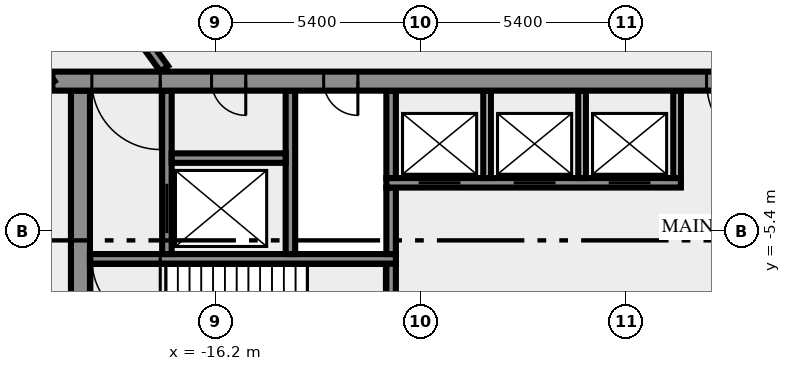
"""IFC4 building model, lengths in metres.
Left out: names, types, materials, properties, quantities, classifications, styles, units other than length and angle.
Written with IfcOpenShell. Run it as: python <this file> out.ifc"""

import sys

from ifc_helpers import new_model, si_unit, direction, frame, frame_2d, origin, place, context, subcontext, project, spatial, rectangle, extrude, element, fill, save


model = new_model("IFC4")
c1 = context("Model", 3, precision=1e-05, world=origin(), true_north=direction((0.0, 1.0)))
c2 = subcontext(c1, "Body", "Model", "MODEL_VIEW")
j1 = project(units=[si_unit("LENGTHUNIT", "METRE"), si_unit("PLANEANGLEUNIT", "RADIAN")], contexts=[c1])
p1 = place(None, origin())
s1 = spatial("IfcSite", under=j1, at=p1, CompositionType="ELEMENT")
p2 = place(p1, origin())
s2 = spatial("IfcBuilding", under=s1, at=p2, CompositionType="ELEMENT")
p3 = place(p2, origin())
s3 = spatial("IfcBuildingStorey", under=s2, at=p3, CompositionType="ELEMENT", Elevation=0.0)
p4 = place(p3, frame((-19.75, -11.0, 0.0), z_axis=(0.0, 0.0, 1.0), x_axis=(0.0, 1.0, 0.0)))
e1 = element("IfcWall", 1, at=p4, inside=s3, PredefinedType="SHEAR", context=c2, shape_type="SweptSolid", body=[
    extrude(rectangle(XDim=9.3, YDim=0.5, at=frame_2d((4.65, 0.0))), origin(), (0.0, 0.0, 1.0), 5.6),
])
p5 = place(p3, frame((-11.575, -7.25, 0.0), z_axis=(0.0, 0.0, 1.0), x_axis=(0.0, 1.0, 0.0)))
e2 = element("IfcWall", 2, at=p5, inside=s3, PredefinedType="SHEAR", context=c2, shape_type="SweptSolid", body=[
    extrude(rectangle(XDim=1.0, YDim=0.25, at=frame_2d((0.5, 0.0))), origin(), (0.0, 0.0, 1.0), 5.6),
])
p6 = place(p3, frame((-11.45, -6.125, 0.0), z_axis=(0.0, 0.0, 1.0), x_axis=(-1.0, 0.0, 0.0)))
e3 = element("IfcWall", 3, at=p6, inside=s3, PredefinedType="SHEAR", context=c2, shape_type="SweptSolid", body=[
    extrude(rectangle(XDim=8.05, YDim=0.25, at=frame_2d((4.025, 0.0))), origin(), (0.0, 0.0, 1.0), 5.6),
])
p7 = place(p6, frame((6.2, 0.0, 0.0)))
e4 = element("IfcOpeningElement", 4, at=p7, cuts=e3, PredefinedType="OPENING", context=c2, shape_type="SweptSolid", body=[
    extrude(rectangle(XDim=1.8, YDim=2.1, at=frame_2d((0.9, 1.05))), frame((0.0, 0.135, 0.0), z_axis=(0.0, -1.0, 0.0), x_axis=(1.0, 0.0, 0.0)), (0.0, 0.0, 1.0), 0.27),
])
p8 = place(p3, frame((-17.475, -6.0, 0.0), z_axis=(0.0, 0.0, 1.0), x_axis=(0.0, 1.0, 0.0)))
e5 = element("IfcWall", 5, at=p8, inside=s3, PredefinedType="SHEAR", context=c2, shape_type="SweptSolid", body=[
    extrude(rectangle(XDim=4.3, YDim=0.25, at=frame_2d((2.15, 0.0))), origin(), (0.0, 0.0, 1.0), 5.6),
])
p9 = place(p8, frame((0.55, 0.0, 0.0)))
e6 = element("IfcOpeningElement", 6, at=p9, cuts=e5, PredefinedType="OPENING", context=c2, shape_type="SweptSolid", body=[
    extrude(rectangle(XDim=1.3, YDim=2.1, at=frame_2d((0.65, 1.05))), frame((0.0, 0.135, 0.0), z_axis=(0.0, -1.0, 0.0), x_axis=(1.0, 0.0, 0.0)), (0.0, 0.0, 1.0), 0.27),
])
p10 = place(p3, frame((-14.225, -6.0, 0.0), z_axis=(0.0, 0.0, 1.0), x_axis=(0.0, 1.0, 0.0)))
e7 = element("IfcWall", 7, at=p10, inside=s3, PredefinedType="SHEAR", context=c2, shape_type="SweptSolid", body=[
    extrude(rectangle(XDim=4.3, YDim=0.25, at=frame_2d((2.15, 0.0))), origin(), (0.0, 0.0, 1.0), 5.6),
])
p11 = place(p3, frame((-11.575, -6.0, 0.0), z_axis=(0.0, 0.0, 1.0), x_axis=(0.0, 1.0, 0.0)))
e8 = element("IfcWall", 8, at=p11, inside=s3, PredefinedType="SHEAR", context=c2, shape_type="SweptSolid", body=[
    extrude(rectangle(XDim=1.75, YDim=0.25, at=frame_2d((0.875, 0.0))), origin(), (0.0, 0.0, 1.0), 5.6),
])
p12 = place(p3, frame((-11.7, -4.125, 0.0), z_axis=(0.0, 0.0, 1.0), x_axis=(1.0, 0.0, 0.0)))
e9 = element("IfcWall", 9, at=p12, inside=s3, PredefinedType="SHEAR", context=c2, shape_type="SweptSolid", body=[
    extrude(rectangle(XDim=7.75, YDim=0.25, at=frame_2d((3.875, 0.0))), origin(), (0.0, 0.0, 1.0), 5.6),
])
p13 = place(p12, frame((0.85, 0.0, 0.0)))
e10 = element("IfcOpeningElement", 10, at=p13, cuts=e9, PredefinedType="OPENING", context=c2, shape_type="SweptSolid", body=[
    extrude(rectangle(XDim=1.1, YDim=2.1, at=frame_2d((0.55, 1.05))), frame((0.0, 0.135, 0.0), z_axis=(0.0, -1.0, 0.0), x_axis=(1.0, 0.0, 0.0)), (0.0, 0.0, 1.0), 0.27),
])
p14 = place(p12, frame((3.35, 0.0, 0.0)))
e11 = element("IfcOpeningElement", 11, at=p14, cuts=e9, PredefinedType="OPENING", context=c2, shape_type="SweptSolid", body=[
    extrude(rectangle(XDim=1.1, YDim=2.1, at=frame_2d((0.55, 1.05))), frame((0.0, 0.135, 0.0), z_axis=(0.0, -1.0, 0.0), x_axis=(1.0, 0.0, 0.0)), (0.0, 0.0, 1.0), 0.27),
])
p15 = place(p12, frame((5.85, 0.0, 0.0)))
e12 = element("IfcOpeningElement", 12, at=p15, cuts=e9, PredefinedType="OPENING", context=c2, shape_type="SweptSolid", body=[
    extrude(rectangle(XDim=1.1, YDim=2.1, at=frame_2d((0.55, 1.05))), frame((0.0, 0.135, 0.0), z_axis=(0.0, -1.0, 0.0), x_axis=(1.0, 0.0, 0.0)), (0.0, 0.0, 1.0), 0.27),
])
p16 = place(p3, frame((-11.575, -4.0, 0.0), z_axis=(0.0, 0.0, 1.0), x_axis=(0.0, 1.0, 0.0)))
e13 = element("IfcWall", 13, at=p16, inside=s3, PredefinedType="SHEAR", context=c2, shape_type="SweptSolid", body=[
    extrude(rectangle(XDim=2.3, YDim=0.25, at=frame_2d((1.15, 0.0))), origin(), (0.0, 0.0, 1.0), 5.6),
])
for number, where, z_axis, x_axis in (
    (14, (-9.05, -4.0, 0.0), (0.0, 0.0, 1.0), (0.0, 1.0, 0.0)),
    (15, (-6.55, -4.0, 0.0), (0.0, 0.0, 1.0), (0.0, 1.0, 0.0)),
    (16, (-4.05, -4.0, 0.0), (0.0, 0.0, 1.0), (0.0, 1.0, 0.0)),
):
    element("IfcWall", number, at=place(p3, frame(where, z_axis=z_axis, x_axis=x_axis)), inside=s3, PredefinedType="SOLIDWALL", context=c2, shape_type="SweptSolid", body=[
        extrude(rectangle(XDim=2.3, YDim=0.2, at=frame_2d((1.15, 0.0))), origin(), (0.0, 0.0, 1.0), 5.6),
    ])
p17 = place(p3, frame((-17.35, -3.475, 0.0), z_axis=(0.0, 0.0, 1.0), x_axis=(1.0, 0.0, 0.0)))
e17 = element("IfcWall", 17, at=p17, inside=s3, PredefinedType="SHEAR", context=c2, shape_type="SweptSolid", body=[
    extrude(rectangle(XDim=3.0, YDim=0.25, at=frame_2d((1.5, 0.0))), origin(), (0.0, 0.0, 1.0), 5.6),
])
p18 = place(p3, frame((20.49, -1.45, 0.0), z_axis=(0.0, 0.0, 1.0), x_axis=(-1.0, 0.0, 0.0)))
e18 = element("IfcWall", 18, at=p18, inside=s3, PredefinedType="SHEAR", context=c2, shape_type="SweptSolid", body=[
    extrude(rectangle(XDim=40.98, YDim=0.5, at=frame_2d((20.49, 0.0))), origin(), (0.0, 0.0, 1.0), 5.6),
])
p19 = place(p18, frame((38.14, 0.0, 0.0)))
e19 = element("IfcOpeningElement", 19, at=p19, cuts=e18, PredefinedType="OPENING", context=c2, shape_type="SweptSolid", body=[
    extrude(rectangle(XDim=1.8, YDim=2.1, at=frame_2d((0.9, 1.05))), frame((0.0, 0.26, 0.0), z_axis=(0.0, -1.0, 0.0), x_axis=(1.0, 0.0, 0.0)), (0.0, 0.0, 1.0), 0.52),
])
p20 = place(p18, frame((35.89, 0.0, 0.0)))
e20 = element("IfcOpeningElement", 20, at=p20, cuts=e18, PredefinedType="OPENING", context=c2, shape_type="SweptSolid", body=[
    extrude(rectangle(XDim=0.9, YDim=2.1, at=frame_2d((0.45, 1.05))), frame((0.0, 0.26, 0.0), z_axis=(0.0, -1.0, 0.0), x_axis=(1.0, 0.0, 0.0)), (0.0, 0.0, 1.0), 0.52),
])
p21 = place(p18, frame((32.94, 0.0, 0.0)))
e21 = element("IfcOpeningElement", 21, at=p21, cuts=e18, PredefinedType="OPENING", context=c2, shape_type="SweptSolid", body=[
    extrude(rectangle(XDim=0.9, YDim=2.1, at=frame_2d((0.45, 1.05))), frame((0.0, 0.26, 0.0), z_axis=(0.0, -1.0, 0.0), x_axis=(1.0, 0.0, 0.0)), (0.0, 0.0, 1.0), 0.52),
])
p22 = place(p18, frame((21.765, 0.0, 0.0)))
e22 = element("IfcOpeningElement", 22, at=p22, cuts=e18, PredefinedType="OPENING", context=c2, shape_type="SweptSolid", body=[
    extrude(rectangle(XDim=2.0, YDim=2.1, at=frame_2d((1.0, 1.05))), frame((0.0, 0.26, 0.0), z_axis=(0.0, -1.0, 0.0), x_axis=(1.0, 0.0, 0.0)), (0.0, 0.0, 1.0), 0.52),
])
p23 = place(p18, frame((7.14, 0.0, 0.0)))
e23 = element("IfcOpeningElement", 23, at=p23, cuts=e18, PredefinedType="OPENING", context=c2, shape_type="SweptSolid", body=[
    extrude(rectangle(XDim=0.9, YDim=2.1, at=frame_2d((0.45, 1.05))), frame((0.0, 0.26, 0.0), z_axis=(0.0, -1.0, 0.0), x_axis=(1.0, 0.0, 0.0)), (0.0, 0.0, 1.0), 0.52),
])
p24 = place(p18, frame((5.028, 0.0, 0.0)))
e24 = element("IfcOpeningElement", 24, at=p24, cuts=e18, PredefinedType="OPENING", context=c2, shape_type="SweptSolid", body=[
    extrude(rectangle(XDim=0.8, YDim=2.1, at=frame_2d((0.4, 1.05))), frame((0.0, 0.26, 0.0), z_axis=(0.0, -1.0, 0.0), x_axis=(1.0, 0.0, 0.0)), (0.0, 0.0, 1.0), 0.52),
])
p25 = place(p18, frame((3.452, 0.0, 0.0)))
e25 = element("IfcOpeningElement", 25, at=p25, cuts=e18, PredefinedType="OPENING", context=c2, shape_type="SweptSolid", body=[
    extrude(rectangle(XDim=0.8, YDim=2.1, at=frame_2d((0.4, 1.05))), frame((0.0, 0.26, 0.0), z_axis=(0.0, -1.0, 0.0), x_axis=(1.0, 0.0, 0.0)), (0.0, 0.0, 1.0), 0.52),
])
p26 = place(p18, frame((1.04, 0.0, 0.0)))
e26 = element("IfcOpeningElement", 26, at=p26, cuts=e18, PredefinedType="OPENING", context=c2, shape_type="SweptSolid", body=[
    extrude(rectangle(XDim=1.8, YDim=2.1, at=frame_2d((0.9, 1.05))), frame((0.0, 0.26, 0.0), z_axis=(0.0, -1.0, 0.0), x_axis=(1.0, 0.0, 0.0)), (0.0, 0.0, 1.0), 0.52),
])
p27 = place(p3, frame((-20.531, -1.523, 0.0), z_axis=(0.0, 0.0, 1.0), x_axis=(-0.587784522481, 0.809017524614, 0.0)))
e27 = element("IfcWall", 27, at=p27, inside=s3, PredefinedType="SOLIDWALL", context=c2, shape_type="SweptSolid", body=[
    extrude(rectangle(XDim=49.912, YDim=0.25, at=frame_2d((24.956, 0.0))), origin(), (0.0, 0.0, 1.0), 5.6),
])
p28 = place(p27, frame((30.765, 0.0, 0.0)))
e28 = element("IfcOpeningElement", 28, at=p28, cuts=e27, PredefinedType="OPENING", context=c2, shape_type="SweptSolid", body=[
    extrude(rectangle(XDim=0.9, YDim=2.1, at=frame_2d((0.45, 1.05))), frame((0.0, 0.135, 0.0), z_axis=(0.0, -1.0, 0.0), x_axis=(1.0, 0.0, 0.0)), (0.0, 0.0, 1.0), 0.27),
])
p29 = place(p27, frame((22.416, 0.0, 0.0)))
e29 = element("IfcOpeningElement", 29, at=p29, cuts=e27, PredefinedType="OPENING", context=c2, shape_type="SweptSolid", body=[
    extrude(rectangle(XDim=0.9, YDim=2.1, at=frame_2d((0.45, 1.05))), frame((0.0, 0.135, 0.0), z_axis=(0.0, -1.0, 0.0), x_axis=(1.0, 0.0, 0.0)), (0.0, 0.0, 1.0), 0.27),
])
p30 = place(p27, frame((12.966, 0.0, 0.0)))
e30 = element("IfcOpeningElement", 30, at=p30, cuts=e27, PredefinedType="OPENING", context=c2, shape_type="SweptSolid", body=[
    extrude(rectangle(XDim=0.9, YDim=2.1, at=frame_2d((0.45, 1.05))), frame((0.0, 0.135, 0.0), z_axis=(0.0, -1.0, 0.0), x_axis=(1.0, 0.0, 0.0)), (0.0, 0.0, 1.0), 0.27),
])
p31 = place(p27, frame((29.016, 0.0, 0.0)))
e31 = element("IfcOpeningElement", 31, at=p31, cuts=e27, PredefinedType="OPENING", context=c2, shape_type="SweptSolid", body=[
    extrude(rectangle(XDim=0.9, YDim=2.1, at=frame_2d((0.45, 1.05))), frame((0.0, 0.135, 0.0), z_axis=(0.0, -1.0, 0.0), x_axis=(1.0, 0.0, 0.0)), (0.0, 0.0, 1.0), 0.27),
])
p32 = place(p3, frame((-37.232, 25.972, 0.0), z_axis=(0.0, 0.0, 1.0), x_axis=(0.587786323093, -0.809016216391, 0.0)))
e32 = element("IfcWall", 32, at=p32, inside=s3, PredefinedType="SOLIDWALL", context=c2, shape_type="SweptSolid", body=[
    extrude(rectangle(XDim=33.493, YDim=0.25, at=frame_2d((16.747, 0.0))), origin(), (0.0, 0.0, 1.0), 5.6),
])
p33 = place(p32, frame((6.462, 0.0, 0.0)))
e33 = element("IfcOpeningElement", 33, at=p33, cuts=e32, PredefinedType="OPENING", context=c2, shape_type="SweptSolid", body=[
    extrude(rectangle(XDim=1.8, YDim=2.1, at=frame_2d((0.9, 1.05))), frame((0.0, 0.135, 0.0), z_axis=(0.0, -1.0, 0.0), x_axis=(1.0, 0.0, 0.0)), (0.0, 0.0, 1.0), 0.27),
])
p34 = place(p32, frame((15.085, 0.0, 0.0)))
e34 = element("IfcOpeningElement", 34, at=p34, cuts=e32, PredefinedType="OPENING", context=c2, shape_type="SweptSolid", body=[
    extrude(rectangle(XDim=0.9, YDim=2.1, at=frame_2d((0.45, 1.05))), frame((0.0, 0.135, 0.0), z_axis=(0.0, -1.0, 0.0), x_axis=(1.0, 0.0, 0.0)), (0.0, 0.0, 1.0), 0.27),
])
p35 = place(p7, origin())
e35 = element("IfcDoor", 35, at=p35, inside=s3, OperationType="DOUBLE_DOOR_SINGLE_SWING", PredefinedType="DOOR", context=c2, shape_type="SweptSolid", body=[
    extrude(rectangle(XDim=1.8, YDim=2.1, at=frame_2d((0.9, 1.05))), frame((0.0, 0.025, 0.0), z_axis=(0.0, -1.0, 0.0), x_axis=(1.0, 0.0, 0.0)), (0.0, 0.0, 1.0), 0.05),
])
fill(e4, e35)
p36 = place(p9, origin())
e36 = element("IfcDoor", 36, at=p36, inside=s3, OperationType="DOUBLE_DOOR_SLIDING", PredefinedType="DOOR", context=c2, shape_type="SweptSolid", body=[
    extrude(rectangle(XDim=1.3, YDim=2.1, at=frame_2d((0.65, 1.05))), frame((0.0, 0.025, 0.0), z_axis=(0.0, -1.0, 0.0), x_axis=(1.0, 0.0, 0.0)), (0.0, 0.0, 1.0), 0.05),
])
fill(e6, e36)
p37 = place(p13, origin())
e37 = element("IfcDoor", 37, at=p37, inside=s3, OperationType="DOUBLE_DOOR_SLIDING", PredefinedType="DOOR", context=c2, shape_type="SweptSolid", body=[
    extrude(rectangle(XDim=1.1, YDim=2.1, at=frame_2d((0.55, 1.05))), frame((0.0, 0.025, 0.0), z_axis=(0.0, -1.0, 0.0), x_axis=(1.0, 0.0, 0.0)), (0.0, 0.0, 1.0), 0.05),
])
fill(e10, e37)
p38 = place(p14, origin())
e38 = element("IfcDoor", 38, at=p38, inside=s3, OperationType="DOUBLE_DOOR_SLIDING", PredefinedType="DOOR", context=c2, shape_type="SweptSolid", body=[
    extrude(rectangle(XDim=1.1, YDim=2.1, at=frame_2d((0.55, 1.05))), frame((0.0, 0.025, 0.0), z_axis=(0.0, -1.0, 0.0), x_axis=(1.0, 0.0, 0.0)), (0.0, 0.0, 1.0), 0.05),
])
fill(e11, e38)
p39 = place(p15, origin())
e39 = element("IfcDoor", 39, at=p39, inside=s3, OperationType="DOUBLE_DOOR_SLIDING", PredefinedType="DOOR", context=c2, shape_type="SweptSolid", body=[
    extrude(rectangle(XDim=1.1, YDim=2.1, at=frame_2d((0.55, 1.05))), frame((0.0, 0.025, 0.0), z_axis=(0.0, -1.0, 0.0), x_axis=(1.0, 0.0, 0.0)), (0.0, 0.0, 1.0), 0.05),
])
fill(e12, e39)
p40 = place(p19, origin())
e40 = element("IfcDoor", 40, at=p40, inside=s3, OperationType="DOUBLE_DOOR_SINGLE_SWING", PredefinedType="DOOR", context=c2, shape_type="SweptSolid", body=[
    extrude(rectangle(XDim=1.8, YDim=2.1, at=frame_2d((0.9, 1.05))), frame((0.0, 0.025, 0.0), z_axis=(0.0, -1.0, 0.0), x_axis=(1.0, 0.0, 0.0)), (0.0, 0.0, 1.0), 0.05),
])
fill(e19, e40)
p41 = place(p20, origin())
e41 = element("IfcDoor", 41, at=p41, inside=s3, OperationType="SINGLE_SWING_RIGHT", PredefinedType="DOOR", context=c2, shape_type="SweptSolid", body=[
    extrude(rectangle(XDim=0.9, YDim=2.1, at=frame_2d((0.45, 1.05))), frame((0.0, 0.025, 0.0), z_axis=(0.0, -1.0, 0.0), x_axis=(1.0, 0.0, 0.0)), (0.0, 0.0, 1.0), 0.05),
])
fill(e20, e41)
p42 = place(p21, origin())
e42 = element("IfcDoor", 42, at=p42, inside=s3, OperationType="SINGLE_SWING_RIGHT", PredefinedType="DOOR", context=c2, shape_type="SweptSolid", body=[
    extrude(rectangle(XDim=0.9, YDim=2.1, at=frame_2d((0.45, 1.05))), frame((0.0, 0.025, 0.0), z_axis=(0.0, -1.0, 0.0), x_axis=(1.0, 0.0, 0.0)), (0.0, 0.0, 1.0), 0.05),
])
fill(e21, e42)
p43 = place(p22, origin())
e43 = element("IfcDoor", 43, at=p43, inside=s3, OperationType="DOUBLE_DOOR_SINGLE_SWING", PredefinedType="DOOR", context=c2, shape_type="SweptSolid", body=[
    extrude(rectangle(XDim=2.0, YDim=2.1, at=frame_2d((1.0, 1.05))), frame((0.0, 0.025, 0.0), z_axis=(0.0, -1.0, 0.0), x_axis=(1.0, 0.0, 0.0)), (0.0, 0.0, 1.0), 0.05),
])
fill(e22, e43)
save(model, sys.argv[1])
